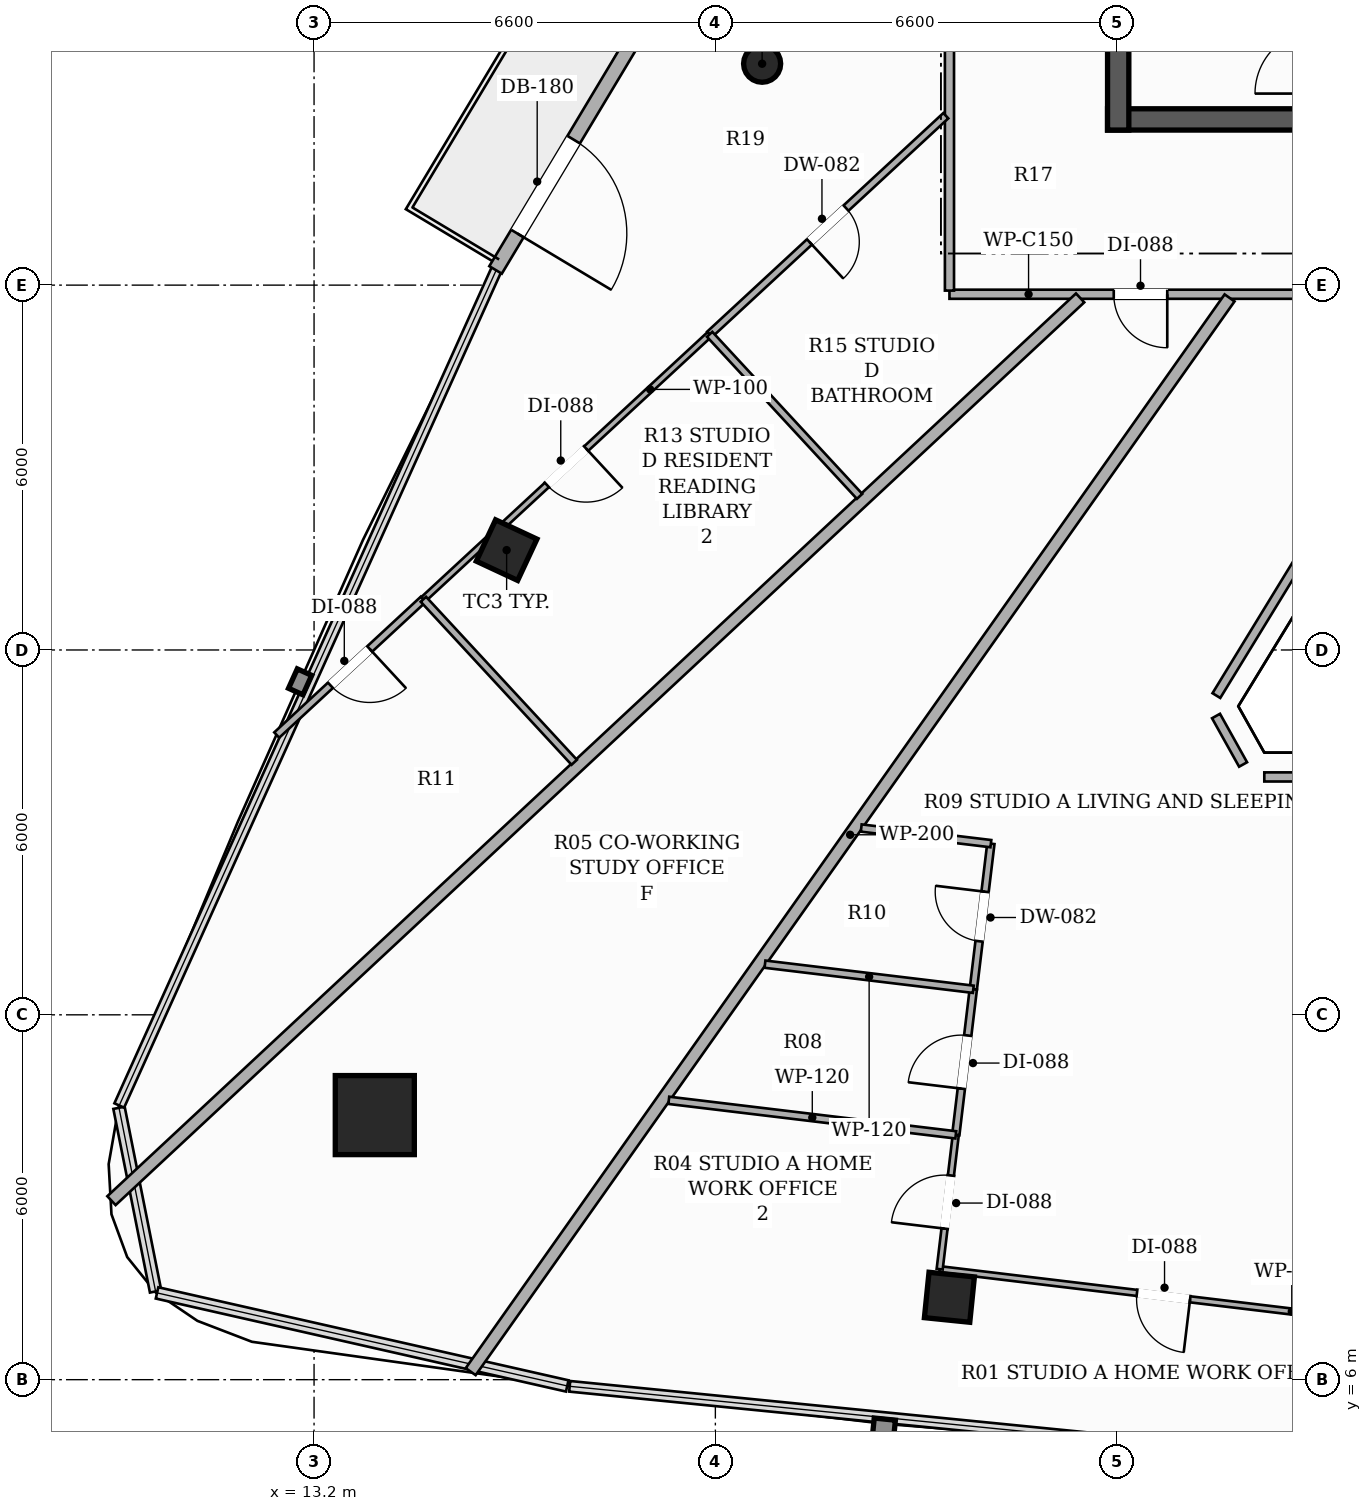
"""IFC4 building model, lengths in metres.
Left out: names, types, materials, properties, quantities, classifications, styles, units other than length and angle.
Written with IfcOpenShell. Run it as: python <this file> out.ifc"""

import sys

from ifc_helpers import new_model, si_unit, direction, frame, frame_2d, origin, origin_2d, place, context, subcontext, project, spatial, rectangle, hollow_rectangle, hollow_circle, extrude, element, fill, save


model = new_model("IFC4")
c1 = context("Model", 3, precision=1e-05, world=origin(), true_north=direction((0.0, 1.0)))
c2 = subcontext(c1, "Body", "Model", "MODEL_VIEW")
j1 = project(units=[si_unit("LENGTHUNIT", "METRE"), si_unit("PLANEANGLEUNIT", "RADIAN")], contexts=[c1])
p1 = place(None, origin())
s1 = spatial("IfcSite", under=j1, at=p1, CompositionType="ELEMENT")
p2 = place(p1, origin())
s2 = spatial("IfcBuilding", under=s1, at=p2, CompositionType="ELEMENT")
p3 = place(p2, frame((0.0, 0.0, 216.2)))
s3 = spatial("IfcBuildingStorey", under=s2, at=p3, CompositionType="ELEMENT", Elevation=216.2)
p4 = place(p3, frame((26.25, 26.725, 0.0), z_axis=(0.0, 0.0, 1.0), x_axis=(1.0, 0.0, 0.0)))
e1 = element("IfcWall", 1, at=p4, inside=s3, PredefinedType="SHEAR", context=c2, shape_type="SweptSolid", body=[
    extrude(rectangle(XDim=13.5, YDim=0.35, at=frame_2d((6.75, 0.0))), origin(), (0.0, 0.0, 1.0), 3.3),
])
p5 = place(p4, frame((4.35, 0.0, 0.0)))
e2 = element("IfcOpeningElement", 2, at=p5, cuts=e1, PredefinedType="OPENING", context=c2, shape_type="SweptSolid", body=[
    extrude(rectangle(XDim=1.05, YDim=2.15, at=frame_2d((0.525, 1.075))), frame((0.0, 0.185, 0.0), z_axis=(0.0, -1.0, 0.0), x_axis=(1.0, 0.0, 0.0)), (0.0, 0.0, 1.0), 0.37),
])
p6 = place(p4, frame((8.3, 0.0, 0.0)))
e3 = element("IfcOpeningElement", 3, at=p6, cuts=e1, PredefinedType="OPENING", context=c2, shape_type="SweptSolid", body=[
    extrude(rectangle(XDim=1.05, YDim=2.15, at=frame_2d((0.525, 1.075))), frame((0.0, 0.185, 0.0), z_axis=(0.0, -1.0, 0.0), x_axis=(1.0, 0.0, 0.0)), (0.0, 0.0, 1.0), 0.37),
])
p7 = place(p3, frame((26.425, 26.55, 0.0), z_axis=(0.0, 0.0, 1.0), x_axis=(0.0, 1.0, 0.0)))
e4 = element("IfcWall", 4, at=p7, inside=s3, PredefinedType="SHEAR", context=c2, shape_type="SweptSolid", body=[
    extrude(rectangle(XDim=7.5, YDim=0.35, at=frame_2d((3.75, 0.0))), origin(), (0.0, 0.0, 1.0), 3.3),
])
p8 = place(p3, frame((14.199, 10.351, 0.0), z_axis=(0.0, 0.0, 1.0), x_axis=(1.0, 0.0, 0.0)))
e5 = element("IfcColumn", 5, at=p8, inside=s3, PredefinedType="COLUMN", context=c2, shape_type="SweptSolid", body=[
    extrude(hollow_rectangle(XDim=1.3, YDim=1.3, WallThickness=0.04, at=origin_2d()), origin(), (0.0, 0.0, 1.0), 3.3),
])
p9 = place(p3, frame((20.569, 27.641, 0.0), z_axis=(0.0, 0.0, 1.0), x_axis=(1.0, 0.0, 0.0)))
e6 = element("IfcColumn", 6, at=p9, inside=s3, PredefinedType="COLUMN", context=c2, shape_type="SweptSolid", body=[
    extrude(hollow_circle(Radius=0.305, WallThickness=0.016, at=origin_2d()), origin(), (0.0, 0.0, 1.0), 3.3),
])
for number, where, z_axis, x_axis in (
    (7, (16.367, 19.642, 0.0), (0.0, 0.0, 1.0), (0.423, 0.906, 0.0)),
    (8, (23.649, 7.355, 0.0), (0.0, 0.0, 1.0), (-0.995, 0.101, 0.0)),
):
    element("IfcColumn", number, at=place(p3, frame(where, z_axis=z_axis, x_axis=x_axis)), inside=s3, PredefinedType="COLUMN", context=c2, shape_type="SweptSolid", body=[
        extrude(hollow_rectangle(XDim=0.75, YDim=0.75, WallThickness=0.025, at=origin_2d()), origin(), (0.0, 0.0, 1.0), 3.3),
    ])
p10 = place(p3, frame((21.458, 33.042, 0.0), z_axis=(0.0, 0.0, 1.0), x_axis=(-0.51433465168, -0.857589567381, 0.0)))
e9 = element("IfcWall", 9, at=p10, inside=s3, PredefinedType="SOLIDWALL", context=c2, shape_type="SweptSolid", body=[
    extrude(rectangle(XDim=10.252, YDim=0.24, at=frame_2d((5.126, 0.0))), origin(), (0.0, 0.0, 1.0), 2.624),
])
p11 = place(p10, frame((7.754, 0.0, 0.0)))
e10 = element("IfcOpeningElement", 10, at=p11, cuts=e9, PredefinedType="OPENING", context=c2, shape_type="SweptSolid", body=[
    extrude(rectangle(XDim=1.8, YDim=2.2, at=frame_2d((0.9, 1.1))), frame((0.0, 0.13, 0.0), z_axis=(0.0, -1.0, 0.0), x_axis=(1.0, 0.0, 0.0)), (0.0, 0.0, 1.0), 0.26),
])
p12 = place(p3, frame((32.073, 23.85, 0.0), z_axis=(0.0, 0.0, 1.0), x_axis=(-1.0, 0.0, 0.0)))
e11 = element("IfcWall", 11, at=p12, inside=s3, PredefinedType="PARTITIONING", context=c2, shape_type="SweptSolid", body=[
    extrude(rectangle(XDim=8.423, YDim=0.15, at=frame_2d((4.211, 0.0))), origin(), (0.0, 0.0, 1.0), 2.565),
])
p13 = place(p12, frame((1.601, 0.0, 0.0)))
e12 = element("IfcOpeningElement", 12, at=p13, cuts=e11, PredefinedType="OPENING", context=c2, shape_type="SweptSolid", body=[
    extrude(rectangle(XDim=0.92, YDim=2.15, at=frame_2d((0.46, 1.075))), frame((0.0, 0.085, 0.0), z_axis=(0.0, -1.0, 0.0), x_axis=(1.0, 0.0, 0.0)), (0.0, 0.0, 1.0), 0.17),
])
p14 = place(p12, frame((4.841, 0.0, 0.0)))
e13 = element("IfcOpeningElement", 13, at=p14, cuts=e11, PredefinedType="OPENING", context=c2, shape_type="SweptSolid", body=[
    extrude(rectangle(XDim=0.88, YDim=2.1, at=frame_2d((0.44, 1.05))), frame((0.0, 0.085, 0.0), z_axis=(0.0, -1.0, 0.0), x_axis=(1.0, 0.0, 0.0)), (0.0, 0.0, 1.0), 0.17),
])
p15 = place(p3, frame((23.65, 23.91, 0.0), z_axis=(0.0, 0.0, 1.0), x_axis=(0.0, 1.0, 0.0)))
e14 = element("IfcWall", 14, at=p15, inside=s3, PredefinedType="PARTITIONING", context=c2, shape_type="SweptSolid", body=[
    extrude(rectangle(XDim=12.163, YDim=0.15, at=frame_2d((6.082, 0.0))), origin(), (0.0, 0.0, 1.0), 2.492),
])
p16 = place(p15, frame((5.622, 0.0, 0.0)))
e15 = element("IfcOpeningElement", 15, at=p16, cuts=e14, PredefinedType="OPENING", context=c2, shape_type="SweptSolid", body=[
    extrude(rectangle(XDim=0.92, YDim=2.15, at=frame_2d((0.46, 1.075))), frame((0.0, 0.085, 0.0), z_axis=(0.0, -1.0, 0.0), x_axis=(1.0, 0.0, 0.0)), (0.0, 0.0, 1.0), 0.17),
])
p17 = place(p3, frame((37.172, 15.912, 0.0), z_axis=(0.0, 0.0, 1.0), x_axis=(-1.0, 0.0, 0.0)))
e16 = element("IfcWall", 16, at=p17, inside=s3, PredefinedType="PARTITIONING", context=c2, shape_type="SweptSolid", body=[
    extrude(rectangle(XDim=8.344, YDim=0.15, at=frame_2d((4.172, 0.0))), origin(), (0.0, 0.0, 1.0), 2.773),
])
p18 = place(p3, frame((28.479, 16.117, 0.0), z_axis=(0.0, 0.0, 1.0), x_axis=(-0.487503666908, 0.873120939361, 0.0)))
e17 = element("IfcWall", 17, at=p18, inside=s3, PredefinedType="PARTITIONING", context=c2, shape_type="SweptSolid", body=[
    extrude(rectangle(XDim=0.913, YDim=0.15, at=frame_2d((0.457, 0.0))), origin(), (0.0, 0.0, 1.0), 3.06),
])
p19 = place(p3, frame((28.04, 17.25, 0.0), z_axis=(0.0, 0.0, 1.0), x_axis=(0.521949656317, 0.852976292912, 0.0)))
e18 = element("IfcWall", 18, at=p19, inside=s3, PredefinedType="PARTITIONING", context=c2, shape_type="SweptSolid", body=[
    extrude(rectangle(XDim=7.667, YDim=0.15, at=frame_2d((3.833, 0.0))), origin(), (0.0, 0.0, 1.0), 2.773),
])
p20 = place(p3, frame((15.776, 6.132, 0.0), z_axis=(0.0, 0.0, 1.0), x_axis=(0.577200381612, 0.816602546816, 0.0)))
e19 = element("IfcWall", 19, at=p20, inside=s3, PredefinedType="PARTITIONING", context=c2, shape_type="SweptSolid", body=[
    extrude(rectangle(XDim=21.624, YDim=0.2, at=frame_2d((10.812, 0.0))), origin(), (0.0, 0.0, 1.0), 2.492),
])
p21 = place(p3, frame((25.799, 23.79, 0.0), z_axis=(0.0, 0.0, 1.0), x_axis=(-0.731584830333, -0.681750420629, 0.0)))
e20 = element("IfcWall", 20, at=p21, inside=s3, PredefinedType="PARTITIONING", context=c2, shape_type="SweptSolid", body=[
    extrude(rectangle(XDim=21.776, YDim=0.2, at=frame_2d((10.888, 0.0))), origin(), (0.0, 0.0, 1.0), 2.492),
])
p22 = place(p3, frame((24.042, 12.42, 0.0), z_axis=(0.0, 0.0, 1.0), x_axis=(0.119823599825, 0.992795197876, 0.0)))
e21 = element("IfcWall", 21, at=p22, inside=s3, PredefinedType="PARTITIONING", context=c2, shape_type="SweptSolid", body=[
    extrude(rectangle(XDim=2.412, YDim=0.12, at=frame_2d((1.206, 0.0))), origin(), (0.0, 0.0, 1.0), 3.06),
])
p23 = place(p22, frame((0.796, 0.0, 0.0)))
e22 = element("IfcOpeningElement", 22, at=p23, cuts=e21, PredefinedType="OPENING", context=c2, shape_type="SweptSolid", body=[
    extrude(rectangle(XDim=0.82, YDim=2.1, at=frame_2d((0.41, 1.05))), frame((0.0, 0.07, 0.0), z_axis=(0.0, -1.0, 0.0), x_axis=(1.0, 0.0, 0.0)), (0.0, 0.0, 1.0), 0.14),
])
p24 = place(p3, frame((24.331, 14.815, 0.0), z_axis=(0.0, 0.0, 1.0), x_axis=(-0.992808897326, 0.119710038805, 0.0)))
e23 = element("IfcWall", 23, at=p24, inside=s3, PredefinedType="PARTITIONING", context=c2, shape_type="SweptSolid", body=[
    extrude(rectangle(XDim=2.147, YDim=0.12, at=frame_2d((1.074, 0.0))), origin(), (0.0, 0.0, 1.0), 3.06),
])
p25 = place(p3, frame((23.754, 10.026, 0.0), z_axis=(0.0, 0.0, 1.0), x_axis=(0.119472593193, 0.992837499028, 0.0)))
e24 = element("IfcWall", 24, at=p25, inside=s3, PredefinedType="PARTITIONING", context=c2, shape_type="SweptSolid", body=[
    extrude(rectangle(XDim=2.411, YDim=0.12, at=frame_2d((1.206, 0.0))), origin(), (0.0, 0.0, 1.0), 3.06),
])
p26 = place(p25, frame((0.766, 0.0, 0.0)))
e25 = element("IfcOpeningElement", 25, at=p26, cuts=e24, PredefinedType="OPENING", context=c2, shape_type="SweptSolid", body=[
    extrude(rectangle(XDim=0.88, YDim=2.1, at=frame_2d((0.44, 1.05))), frame((0.0, 0.07, 0.0), z_axis=(0.0, -1.0, 0.0), x_axis=(1.0, 0.0, 0.0)), (0.0, 0.0, 1.0), 0.14),
])
p27 = place(p3, frame((30.853, 6.931, 0.0), z_axis=(0.0, 0.0, 1.0), x_axis=(-0.992840033501, 0.119451529409, 0.0)))
e26 = element("IfcWall", 26, at=p27, inside=s3, PredefinedType="PARTITIONING", context=c2, shape_type="SweptSolid", body=[
    extrude(rectangle(XDim=7.417, YDim=0.1, at=frame_2d((3.708, 0.0))), origin(), (0.0, 0.0, 1.0), 2.492),
])
p28 = place(p27, frame((3.269, 0.0, 0.0)))
e27 = element("IfcOpeningElement", 27, at=p28, cuts=e26, PredefinedType="OPENING", context=c2, shape_type="SweptSolid", body=[
    extrude(rectangle(XDim=0.88, YDim=2.1, at=frame_2d((0.44, 1.05))), frame((0.0, 0.06, 0.0), z_axis=(0.0, -1.0, 0.0), x_axis=(1.0, 0.0, 0.0)), (0.0, 0.0, 1.0), 0.12),
])
p29 = place(p3, frame((23.489, 7.817, 0.0), z_axis=(0.0, 0.0, 1.0), x_axis=(0.119063005136, 0.992886700892, 0.0)))
e28 = element("IfcWall", 28, at=p29, inside=s3, PredefinedType="PARTITIONING", context=c2, shape_type="SweptSolid", body=[
    extrude(rectangle(XDim=2.225, YDim=0.1, at=frame_2d((1.112, 0.0))), origin(), (0.0, 0.0, 1.0), 2.492),
])
p30 = place(p29, frame((0.672, 0.0, 0.0)))
e29 = element("IfcOpeningElement", 29, at=p30, cuts=e28, PredefinedType="OPENING", context=c2, shape_type="SweptSolid", body=[
    extrude(rectangle(XDim=0.88, YDim=2.1, at=frame_2d((0.44, 1.05))), frame((0.0, 0.06, 0.0), z_axis=(0.0, -1.0, 0.0), x_axis=(1.0, 0.0, 0.0)), (0.0, 0.0, 1.0), 0.12),
])
p31 = place(p3, frame((24.042, 12.42, 0.0), z_axis=(0.0, 0.0, 1.0), x_axis=(-0.992809391247, 0.119705942421, 0.0)))
e30 = element("IfcWall", 30, at=p31, inside=s3, PredefinedType="PARTITIONING", context=c2, shape_type="SweptSolid", body=[
    extrude(rectangle(XDim=3.451, YDim=0.12, at=frame_2d((1.726, 0.0))), origin(), (0.0, 0.0, 1.0), 2.773),
])
p32 = place(p3, frame((23.754, 10.026, 0.0), z_axis=(0.0, 0.0, 1.0), x_axis=(-0.992834006213, 0.1195016155, 0.0)))
e31 = element("IfcWall", 31, at=p32, inside=s3, PredefinedType="PARTITIONING", context=c2, shape_type="SweptSolid", body=[
    extrude(rectangle(XDim=4.754, YDim=0.12, at=frame_2d((2.377, 0.0))), origin(), (0.0, 0.0, 1.0), 2.773),
])
p33 = place(p3, frame((23.59, 26.786, 0.0), z_axis=(0.0, 0.0, 1.0), x_axis=(-0.733888422473, -0.679270037143, 0.0)))
e32 = element("IfcWall", 32, at=p33, inside=s3, PredefinedType="PARTITIONING", context=c2, shape_type="SweptSolid", body=[
    extrude(rectangle(XDim=5.292, YDim=0.12, at=frame_2d((2.646, 0.0))), origin(), (0.0, 0.0, 1.0), 3.06),
])
p34 = place(p33, frame((2.236, 0.0, 0.0)))
e33 = element("IfcOpeningElement", 33, at=p34, cuts=e32, PredefinedType="OPENING", context=c2, shape_type="SweptSolid", body=[
    extrude(rectangle(XDim=0.82, YDim=2.1, at=frame_2d((0.41, 1.05))), frame((0.0, 0.07, 0.0), z_axis=(0.0, -1.0, 0.0), x_axis=(1.0, 0.0, 0.0)), (0.0, 0.0, 1.0), 0.14),
])
p35 = place(p3, frame((14.998, 18.834, 0.0), z_axis=(0.0, 0.0, 1.0), x_axis=(-0.733840210512, -0.679322121998, 0.0)))
e34 = element("IfcWall", 34, at=p35, inside=s3, PredefinedType="PARTITIONING", context=c2, shape_type="SweptSolid", body=[
    extrude(rectangle(XDim=3.287, YDim=0.12, at=frame_2d((1.644, 0.0))), origin(), (0.0, 0.0, 1.0), 3.06),
])
p36 = place(p35, frame((1.203, 0.0, 0.0)))
e35 = element("IfcOpeningElement", 35, at=p36, cuts=e34, PredefinedType="OPENING", context=c2, shape_type="SweptSolid", body=[
    extrude(rectangle(XDim=0.88, YDim=2.1, at=frame_2d((0.44, 1.05))), frame((0.0, 0.07, 0.0), z_axis=(0.0, -1.0, 0.0), x_axis=(1.0, 0.0, 0.0)), (0.0, 0.0, 1.0), 0.14),
])
p37 = place(p3, frame((19.706, 23.191, 0.0), z_axis=(0.0, 0.0, 1.0), x_axis=(-0.733941951163, -0.679212199775, 0.0)))
e36 = element("IfcWall", 36, at=p37, inside=s3, PredefinedType="PARTITIONING", context=c2, shape_type="SweptSolid", body=[
    extrude(rectangle(XDim=6.415, YDim=0.1, at=frame_2d((3.208, 0.0))), origin(), (0.0, 0.0, 1.0), 2.492),
])
p38 = place(p37, frame((2.767, 0.0, 0.0)))
e37 = element("IfcOpeningElement", 37, at=p38, cuts=e36, PredefinedType="OPENING", context=c2, shape_type="SweptSolid", body=[
    extrude(rectangle(XDim=0.88, YDim=2.1, at=frame_2d((0.44, 1.05))), frame((0.0, 0.06, 0.0), z_axis=(0.0, -1.0, 0.0), x_axis=(1.0, 0.0, 0.0)), (0.0, 0.0, 1.0), 0.12),
])
p39 = place(p3, frame((22.172, 20.526, 0.0), z_axis=(0.0, 0.0, 1.0), x_axis=(-0.67917603964, 0.733975413198, 0.0)))
e38 = element("IfcWall", 38, at=p39, inside=s3, PredefinedType="PARTITIONING", context=c2, shape_type="SweptSolid", body=[
    extrude(rectangle(XDim=3.631, YDim=0.12, at=frame_2d((1.815, 0.0))), origin(), (0.0, 0.0, 1.0), 2.565),
])
p40 = place(p3, frame((14.998, 18.834, 0.0), z_axis=(0.0, 0.0, 1.0), x_axis=(0.67920675179, -0.733946992856, 0.0)))
e39 = element("IfcWall", 39, at=p40, inside=s3, PredefinedType="PARTITIONING", context=c2, shape_type="SweptSolid", body=[
    extrude(rectangle(XDim=3.653, YDim=0.12, at=frame_2d((1.826, 0.0))), origin(), (0.0, 0.0, 1.0), 2.492),
])
p41 = place(p11, origin())
e40 = element("IfcDoor", 40, at=p41, inside=s3, OperationType="SINGLE_SWING_RIGHT", PredefinedType="DOOR", context=c2, shape_type="SweptSolid", body=[
    extrude(rectangle(XDim=1.8, YDim=2.2, at=frame_2d((0.9, 1.1))), frame((0.0, 0.025, 0.0), z_axis=(0.0, -1.0, 0.0), x_axis=(1.0, 0.0, 0.0)), (0.0, 0.0, 1.0), 0.05),
])
fill(e10, e40)
p42 = place(p23, origin())
e41 = element("IfcDoor", 41, at=p42, inside=s3, OperationType="SINGLE_SWING_RIGHT", PredefinedType="DOOR", context=c2, shape_type="SweptSolid", body=[
    extrude(rectangle(XDim=0.82, YDim=2.1, at=frame_2d((0.41, 1.05))), frame((0.0, 0.025, 0.0), z_axis=(0.0, -1.0, 0.0), x_axis=(1.0, 0.0, 0.0)), (0.0, 0.0, 1.0), 0.05),
])
fill(e22, e41)
p43 = place(p26, origin())
e42 = element("IfcDoor", 42, at=p43, inside=s3, OperationType="SINGLE_SWING_LEFT", PredefinedType="DOOR", context=c2, shape_type="SweptSolid", body=[
    extrude(rectangle(XDim=0.88, YDim=2.1, at=frame_2d((0.44, 1.05))), frame((0.0, 0.025, 0.0), z_axis=(0.0, -1.0, 0.0), x_axis=(1.0, 0.0, 0.0)), (0.0, 0.0, 1.0), 0.05),
])
fill(e25, e42)
p44 = place(p28, origin())
e43 = element("IfcDoor", 43, at=p44, inside=s3, OperationType="SINGLE_SWING_LEFT", PredefinedType="DOOR", context=c2, shape_type="SweptSolid", body=[
    extrude(rectangle(XDim=0.88, YDim=2.1, at=frame_2d((0.44, 1.05))), frame((0.0, 0.025, 0.0), z_axis=(0.0, -1.0, 0.0), x_axis=(1.0, 0.0, 0.0)), (0.0, 0.0, 1.0), 0.05),
])
fill(e27, e43)
p45 = place(p30, origin())
e44 = element("IfcDoor", 44, at=p45, inside=s3, OperationType="SINGLE_SWING_LEFT", PredefinedType="DOOR", context=c2, shape_type="SweptSolid", body=[
    extrude(rectangle(XDim=0.88, YDim=2.1, at=frame_2d((0.44, 1.05))), frame((0.0, 0.025, 0.0), z_axis=(0.0, -1.0, 0.0), x_axis=(1.0, 0.0, 0.0)), (0.0, 0.0, 1.0), 0.05),
])
fill(e29, e44)
p46 = place(p34, origin())
e45 = element("IfcDoor", 45, at=p46, inside=s3, OperationType="SINGLE_SWING_RIGHT", PredefinedType="DOOR", context=c2, shape_type="SweptSolid", body=[
    extrude(rectangle(XDim=0.82, YDim=2.1, at=frame_2d((0.41, 1.05))), frame((0.0, 0.025, 0.0), z_axis=(0.0, -1.0, 0.0), x_axis=(1.0, 0.0, 0.0)), (0.0, 0.0, 1.0), 0.05),
])
fill(e33, e45)
p47 = place(p36, origin())
e46 = element("IfcDoor", 46, at=p47, inside=s3, OperationType="SINGLE_SWING_LEFT", PredefinedType="DOOR", context=c2, shape_type="SweptSolid", body=[
    extrude(rectangle(XDim=0.88, YDim=2.1, at=frame_2d((0.44, 1.05))), frame((0.0, 0.025, 0.0), z_axis=(0.0, -1.0, 0.0), x_axis=(1.0, 0.0, 0.0)), (0.0, 0.0, 1.0), 0.05),
])
fill(e35, e46)
p48 = place(p38, origin())
e47 = element("IfcDoor", 47, at=p48, inside=s3, OperationType="SINGLE_SWING_LEFT", PredefinedType="DOOR", context=c2, shape_type="SweptSolid", body=[
    extrude(rectangle(XDim=0.88, YDim=2.1, at=frame_2d((0.44, 1.05))), frame((0.0, 0.025, 0.0), z_axis=(0.0, -1.0, 0.0), x_axis=(1.0, 0.0, 0.0)), (0.0, 0.0, 1.0), 0.05),
])
fill(e37, e47)
p49 = place(p14, origin())
e48 = element("IfcDoor", 48, at=p49, inside=s3, OperationType="SINGLE_SWING_LEFT", PredefinedType="DOOR", context=c2, shape_type="SweptSolid", body=[
    extrude(rectangle(XDim=0.88, YDim=2.1, at=frame_2d((0.44, 1.05))), frame((0.0, 0.025, 0.0), z_axis=(0.0, -1.0, 0.0), x_axis=(1.0, 0.0, 0.0)), (0.0, 0.0, 1.0), 0.05),
])
fill(e13, e48)
save(model, sys.argv[1])
